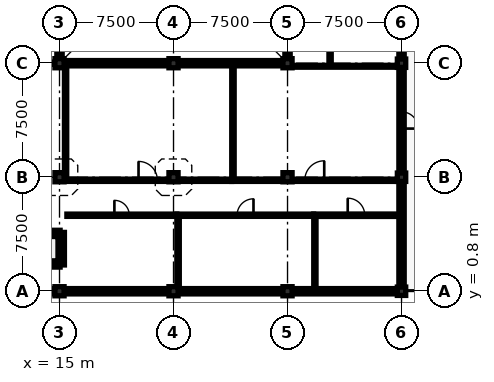
"""IFC4 building model, lengths in metres.
Left out: names, types, materials, properties, quantities, classifications, styles, units other than length and angle.
Written with IfcOpenShell. Run it as: python <this file> out.ifc"""

import sys

from ifc_helpers import new_model, si_unit, direction, frame, frame_2d, origin, origin_2d, place, context, subcontext, project, spatial, rectangle, extrude, element, fill, save


model = new_model("IFC4")
c1 = context("Model", 3, precision=1e-05, world=origin(), true_north=direction((0.0, 1.0)))
c2 = subcontext(c1, "Body", "Model", "MODEL_VIEW")
j1 = project(units=[si_unit("LENGTHUNIT", "METRE"), si_unit("PLANEANGLEUNIT", "RADIAN")], contexts=[c1])
p1 = place(None, origin())
s1 = spatial("IfcSite", under=j1, at=p1, CompositionType="ELEMENT")
p2 = place(p1, origin())
s2 = spatial("IfcBuilding", under=s1, at=p2, CompositionType="ELEMENT")
p3 = place(p2, frame((0.0, 0.0, 13.5)))
s3 = spatial("IfcBuildingStorey", under=s2, at=p3, CompositionType="ELEMENT", Elevation=13.5)
for number, where, z_axis, x_axis in (
    (1, (15.0, 0.8, 0.0), (0.0, 0.0, 1.0), (1.0, 0.0, 0.0)),
    (2, (15.0, 8.3, 0.0), (0.0, 0.0, 1.0), (1.0, 0.0, 0.0)),
    (3, (15.0, 15.8, 0.0), (0.0, 0.0, 1.0), (1.0, 0.0, 0.0)),
    (4, (22.5, 0.8, 0.0), (0.0, 0.0, 1.0), (1.0, 0.0, 0.0)),
    (5, (22.5, 8.3, 0.0), (0.0, 0.0, 1.0), (1.0, 0.0, 0.0)),
    (6, (22.5, 15.8, 0.0), (0.0, 0.0, 1.0), (1.0, 0.0, 0.0)),
    (7, (30.0, 0.8, 0.0), (0.0, 0.0, 1.0), (1.0, 0.0, 0.0)),
    (8, (30.0, 8.3, 0.0), (0.0, 0.0, 1.0), (1.0, 0.0, 0.0)),
    (9, (30.0, 15.8, 0.0), (0.0, 0.0, 1.0), (1.0, 0.0, 0.0)),
):
    element("IfcColumn", number, at=place(p3, frame(where, z_axis=z_axis, x_axis=x_axis)), inside=s3, PredefinedType="COLUMN", context=c2, shape_type="SweptSolid", body=[
        extrude(rectangle(XDim=0.6, YDim=0.6, at=origin_2d()), origin(), (0.0, 0.0, 1.0), 3.72),
    ])
for number, where, z_axis, x_axis in (
    (10, (37.5, 0.8, 0.0), (0.0, 0.0, 1.0), (1.0, 0.0, 0.0)),
    (11, (37.5, 8.3, 0.0), (0.0, 0.0, 1.0), (1.0, 0.0, 0.0)),
    (12, (37.5, 15.8, 0.0), (0.0, 0.0, 1.0), (1.0, 0.0, 0.0)),
):
    element("IfcColumn", number, at=place(p3, frame(where, z_axis=z_axis, x_axis=x_axis)), inside=s3, PredefinedType="COLUMN", context=c2, shape_type="SweptSolid", body=[
        extrude(rectangle(XDim=0.55, YDim=0.55, at=origin_2d()), origin(), (0.0, 0.0, 1.0), 3.75),
    ])
p4 = place(p3, frame((37.5, 23.05, 0.0), z_axis=(0.0, 0.0, 1.0), x_axis=(0.0, -1.0, 0.0)))
e13 = element("IfcWall", 13, at=p4, inside=s3, PredefinedType="SOLIDWALL", context=c2, shape_type="SweptSolid", body=[
    extrude(rectangle(XDim=6.975, YDim=0.35, at=frame_2d((3.488, 0.0))), origin(), (0.0, 0.0, 1.0), 3.055),
])
p5 = place(p3, frame((37.5, 15.525, 0.0), z_axis=(0.0, 0.0, 1.0), x_axis=(0.0, -1.0, 0.0)))
e14 = element("IfcWall", 14, at=p5, inside=s3, PredefinedType="SOLIDWALL", context=c2, shape_type="SweptSolid", body=[
    extrude(rectangle(XDim=6.95, YDim=0.35, at=frame_2d((3.475, 0.0))), origin(), (0.0, 0.0, 1.0), 3.005),
])
p6 = place(p5, frame((2.925, 0.0, 0.0)))
e15 = element("IfcOpeningElement", 15, at=p6, cuts=e14, PredefinedType="OPENING", context=c2, shape_type="SweptSolid", body=[
    extrude(rectangle(XDim=1.1, YDim=2.15, at=frame_2d((0.55, 1.075))), frame((0.0, 0.187, 0.0), z_axis=(0.0, -1.0, 0.0), x_axis=(1.0, 0.0, 0.0)), (0.0, 0.0, 1.0), 0.374),
])
p7 = place(p3, frame((37.5, 8.025, 0.0), z_axis=(0.0, 0.0, 1.0), x_axis=(0.0, -1.0, 0.0)))
e16 = element("IfcWall", 16, at=p7, inside=s3, PredefinedType="SOLIDWALL", context=c2, shape_type="SweptSolid", body=[
    extrude(rectangle(XDim=6.95, YDim=0.35, at=frame_2d((3.475, 0.0))), origin(), (0.0, 0.0, 1.0), 3.005),
])
p8 = place(p3, frame((37.225, 0.8, 0.0), z_axis=(0.0, 0.0, 1.0), x_axis=(-1.0, 0.0, 0.0)))
e17 = element("IfcWall", 17, at=p8, inside=s3, PredefinedType="SOLIDWALL", context=c2, shape_type="SweptSolid", body=[
    extrude(rectangle(XDim=6.925, YDim=0.35, at=frame_2d((3.462, 0.0))), origin(), (0.0, 0.0, 1.0), 3.005),
])
p9 = place(p3, frame((29.7, 0.8, 0.0), z_axis=(0.0, 0.0, 1.0), x_axis=(-1.0, 0.0, 0.0)))
e18 = element("IfcWall", 18, at=p9, inside=s3, PredefinedType="SOLIDWALL", context=c2, shape_type="SweptSolid", body=[
    extrude(rectangle(XDim=6.9, YDim=0.35, at=frame_2d((3.45, 0.0))), origin(), (0.0, 0.0, 1.0), 2.805),
])
p10 = place(p3, frame((22.2, 0.8, 0.0), z_axis=(0.0, 0.0, 1.0), x_axis=(-1.0, 0.0, 0.0)))
e19 = element("IfcWall", 19, at=p10, inside=s3, PredefinedType="SOLIDWALL", context=c2, shape_type="SweptSolid", body=[
    extrude(rectangle(XDim=6.9, YDim=0.35, at=frame_2d((3.45, 0.0))), origin(), (0.0, 0.0, 1.0), 2.805),
])
p11 = place(p10, frame((2.65, 0.0, 0.9)))
e20 = element("IfcOpeningElement", 20, at=p11, cuts=e19, PredefinedType="OPENING", context=c2, shape_type="SweptSolid", body=[
    extrude(rectangle(XDim=1.6, YDim=1.3, at=frame_2d((0.8, 0.65))), frame((0.0, 0.187, 0.0), z_axis=(0.0, -1.0, 0.0), x_axis=(1.0, 0.0, 0.0)), (0.0, 0.0, 1.0), 0.374),
])
p12 = place(p3, frame((14.7, 0.8, 0.0), z_axis=(0.0, 0.0, 1.0), x_axis=(-1.0, 0.0, 0.0)))
e21 = element("IfcWall", 21, at=p12, inside=s3, PredefinedType="SOLIDWALL", context=c2, shape_type="SweptSolid", body=[
    extrude(rectangle(XDim=6.9, YDim=0.35, at=frame_2d((3.45, 0.0))), origin(), (0.0, 0.0, 1.0), 3.055),
])
p13 = place(p12, frame((2.65, 0.0, 0.9)))
e22 = element("IfcOpeningElement", 22, at=p13, cuts=e21, PredefinedType="OPENING", context=c2, shape_type="SweptSolid", body=[
    extrude(rectangle(XDim=1.6, YDim=1.5, at=frame_2d((0.8, 0.75))), frame((0.0, 0.187, 0.0), z_axis=(0.0, -1.0, 0.0), x_axis=(1.0, 0.0, 0.0)), (0.0, 0.0, 1.0), 0.374),
])
for number, where, z_axis, x_axis in (
    (23, (15.3, 15.8, 0.0), (0.0, 0.0, 1.0), (1.0, 0.0, 0.0)),
    (24, (22.8, 15.8, 0.0), (0.0, 0.0, 1.0), (1.0, 0.0, 0.0)),
):
    element("IfcWall", number, at=place(p3, frame(where, z_axis=z_axis, x_axis=x_axis)), inside=s3, PredefinedType="SOLIDWALL", context=c2, shape_type="SweptSolid", body=[
        extrude(rectangle(XDim=6.9, YDim=0.35, at=frame_2d((3.45, 0.0))), origin(), (0.0, 0.0, 1.0), 2.805),
    ])
p14 = place(p3, frame((30.0, 16.1, 0.0), z_axis=(0.0, 0.0, 1.0), x_axis=(0.0, 1.0, 0.0)))
e25 = element("IfcWall", 25, at=p14, inside=s3, PredefinedType="SOLIDWALL", context=c2, shape_type="SweptSolid", body=[
    extrude(rectangle(XDim=6.95, YDim=0.35, at=frame_2d((3.475, 0.0))), origin(), (0.0, 0.0, 1.0), 3.055),
])
p15 = place(p14, frame((2.575, 0.0, 0.9)))
e26 = element("IfcOpeningElement", 26, at=p15, cuts=e25, PredefinedType="OPENING", context=c2, shape_type="SweptSolid", body=[
    extrude(rectangle(XDim=1.8, YDim=1.7, at=frame_2d((0.9, 0.85))), frame((0.0, 0.187, 0.0), z_axis=(0.0, -1.0, 0.0), x_axis=(1.0, 0.0, 0.0)), (0.0, 0.0, 1.0), 0.374),
])
p16 = place(p3, frame((15.0, 23.0, 0.0), z_axis=(0.0, 0.0, 1.0), x_axis=(0.0, -1.0, 0.0)))
e27 = element("IfcWall", 27, at=p16, inside=s3, PredefinedType="SOLIDWALL", context=c2, shape_type="SweptSolid", body=[
    extrude(rectangle(XDim=6.9, YDim=0.35, at=frame_2d((3.45, 0.0))), origin(), (0.0, 0.0, 1.0), 2.805),
])
p17 = place(p3, frame((12.928, 2.529, 0.0), z_axis=(0.0, 0.0, 1.0), x_axis=(1.0, 0.0, 0.0)))
e28 = element("IfcWall", 28, at=p17, inside=s3, PredefinedType="SHEAR", context=c2, shape_type="SweptSolid", body=[
    extrude(rectangle(XDim=2.11, YDim=0.28, at=frame_2d((1.055, 0.0))), origin(), (0.0, 0.0, 1.0), 3.72),
])
p18 = place(p3, frame((15.184, 2.529, 0.0), z_axis=(0.0, 0.0, 1.0), x_axis=(0.0, 1.0, 0.0)))
e29 = element("IfcWall", 29, at=p18, inside=s3, PredefinedType="SHEAR", context=c2, shape_type="SweptSolid", body=[
    extrude(rectangle(XDim=2.141, YDim=0.28, at=frame_2d((1.071, 0.0))), origin(), (0.0, 0.0, 1.0), 3.72),
])
p19 = place(p3, frame((15.039, 4.671, 0.0), z_axis=(0.0, 0.0, 1.0), x_axis=(-1.0, 0.0, 0.0)))
e30 = element("IfcWall", 30, at=p19, inside=s3, PredefinedType="SHEAR", context=c2, shape_type="SweptSolid", body=[
    extrude(rectangle(XDim=2.11, YDim=0.28, at=frame_2d((1.055, 0.0))), origin(), (0.0, 0.0, 1.0), 3.72),
])
p20 = place(p19, frame((0.505, 0.0, 0.0)))
e31 = element("IfcOpeningElement", 31, at=p20, cuts=e30, PredefinedType="OPENING", context=c2, shape_type="SweptSolid", body=[
    extrude(rectangle(XDim=1.1, YDim=2.15, at=frame_2d((0.55, 1.075))), frame((0.0, 0.152, 0.0), z_axis=(0.0, -1.0, 0.0), x_axis=(1.0, 0.0, 0.0)), (0.0, 0.0, 1.0), 0.304),
])
p21 = place(p3, frame((15.485, 5.8, 0.0), z_axis=(0.0, 0.0, 1.0), x_axis=(1.0, 0.0, 0.0)))
e32 = element("IfcWall", 32, at=p21, inside=s3, PredefinedType="PARTITIONING", context=c2, shape_type="SweptSolid", body=[
    extrude(rectangle(XDim=7.23, YDim=0.15, at=frame_2d((3.615, 0.0))), origin(), (0.0, 0.0, 1.0), 2.805),
])
p22 = place(p21, frame((3.125, 0.0, 0.0)))
e33 = element("IfcOpeningElement", 33, at=p22, cuts=e32, PredefinedType="OPENING", context=c2, shape_type="SweptSolid", body=[
    extrude(rectangle(XDim=0.98, YDim=2.12, at=frame_2d((0.49, 1.06))), frame((0.0, 0.087, 0.0), z_axis=(0.0, -1.0, 0.0), x_axis=(1.0, 0.0, 0.0)), (0.0, 0.0, 1.0), 0.174),
])
p23 = place(p3, frame((22.727, 5.8, 0.0), z_axis=(0.0, 0.0, 1.0), x_axis=(1.0, 0.0, 0.0)))
e34 = element("IfcWall", 34, at=p23, inside=s3, PredefinedType="PARTITIONING", context=c2, shape_type="SweptSolid", body=[
    extrude(rectangle(XDim=8.988, YDim=0.15, at=frame_2d((4.494, 0.0))), origin(), (0.0, 0.0, 1.0), 2.805),
])
p24 = place(p23, frame((3.954, 0.0, 0.0)))
e35 = element("IfcOpeningElement", 35, at=p24, cuts=e34, PredefinedType="OPENING", context=c2, shape_type="SweptSolid", body=[
    extrude(rectangle(XDim=1.08, YDim=2.18, at=frame_2d((0.54, 1.09))), frame((0.0, 0.087, 0.0), z_axis=(0.0, -1.0, 0.0), x_axis=(1.0, 0.0, 0.0)), (0.0, 0.0, 1.0), 0.174),
])
p25 = place(p3, frame((31.727, 5.8, 0.0), z_axis=(0.0, 0.0, 1.0), x_axis=(1.0, 0.0, 0.0)))
e36 = element("IfcWall", 36, at=p25, inside=s3, PredefinedType="PARTITIONING", context=c2, shape_type="SweptSolid", body=[
    extrude(rectangle(XDim=5.586, YDim=0.16, at=frame_2d((2.793, 0.0))), origin(), (0.0, 0.0, 1.0), 3.085),
])
p26 = place(p25, frame((2.233, 0.0, 0.0)))
e37 = element("IfcOpeningElement", 37, at=p26, cuts=e36, PredefinedType="OPENING", context=c2, shape_type="SweptSolid", body=[
    extrude(rectangle(XDim=1.12, YDim=2.2, at=frame_2d((0.56, 1.1))), frame((0.0, 0.092, 0.0), z_axis=(0.0, -1.0, 0.0), x_axis=(1.0, 0.0, 0.0)), (0.0, 0.0, 1.0), 0.184),
])
p27 = place(p3, frame((15.312, 8.1, 0.0), z_axis=(0.0, 0.0, 1.0), x_axis=(1.0, 0.0, 0.0)))
e38 = element("IfcWall", 38, at=p27, inside=s3, PredefinedType="PARTITIONING", context=c2, shape_type="SweptSolid", body=[
    extrude(rectangle(XDim=11.013, YDim=0.15, at=frame_2d((5.506, 0.0))), origin(), (0.0, 0.0, 1.0), 2.805),
])
p28 = place(p27, frame((4.886, 0.0, 0.0)))
e39 = element("IfcOpeningElement", 39, at=p28, cuts=e38, PredefinedType="OPENING", context=c2, shape_type="SweptSolid", body=[
    extrude(rectangle(XDim=1.24, YDim=2.2, at=frame_2d((0.62, 1.1))), frame((0.0, 0.087, 0.0), z_axis=(0.0, -1.0, 0.0), x_axis=(1.0, 0.0, 0.0)), (0.0, 0.0, 1.0), 0.174),
])
p29 = place(p3, frame((26.337, 8.1, 0.0), z_axis=(0.0, 0.0, 1.0), x_axis=(1.0, 0.0, 0.0)))
e40 = element("IfcWall", 40, at=p29, inside=s3, PredefinedType="PARTITIONING", context=c2, shape_type="SweptSolid", body=[
    extrude(rectangle(XDim=10.876, YDim=0.15, at=frame_2d((5.438, 0.0))), origin(), (0.0, 0.0, 1.0), 2.805),
])
p30 = place(p29, frame((4.798, 0.0, 0.0)))
e41 = element("IfcOpeningElement", 41, at=p30, cuts=e40, PredefinedType="OPENING", context=c2, shape_type="SweptSolid", body=[
    extrude(rectangle(XDim=1.28, YDim=2.22, at=frame_2d((0.64, 1.11))), frame((0.0, 0.087, 0.0), z_axis=(0.0, -1.0, 0.0), x_axis=(1.0, 0.0, 0.0)), (0.0, 0.0, 1.0), 0.174),
])
p31 = place(p3, frame((32.8, 15.885, 0.0), z_axis=(0.0, 0.0, 1.0), x_axis=(0.0, 1.0, 0.0)))
e42 = element("IfcWall", 42, at=p31, inside=s3, PredefinedType="PARTITIONING", context=c2, shape_type="SweptSolid", body=[
    extrude(rectangle(XDim=7.33, YDim=0.15, at=frame_2d((3.665, 0.0))), origin(), (0.0, 0.0, 1.0), 3.055),
])
p32 = place(p31, frame((2.945, 0.0, 0.0)))
e43 = element("IfcOpeningElement", 43, at=p32, cuts=e42, PredefinedType="OPENING", context=c2, shape_type="SweptSolid", body=[
    extrude(rectangle(XDim=1.44, YDim=2.32, at=frame_2d((0.72, 1.16))), frame((0.0, 0.087, 0.0), z_axis=(0.0, -1.0, 0.0), x_axis=(1.0, 0.0, 0.0)), (0.0, 0.0, 1.0), 0.174),
])
p33 = place(p3, frame((30.084, 15.6, 0.0), z_axis=(0.0, 0.0, 1.0), x_axis=(1.0, 0.0, 0.0)))
e44 = element("IfcWall", 44, at=p33, inside=s3, PredefinedType="PARTITIONING", context=c2, shape_type="SweptSolid", body=[
    extrude(rectangle(XDim=7.128, YDim=0.125, at=frame_2d((3.564, 0.0))), origin(), (0.0, 0.0, 1.0), 3.005),
])
p34 = place(p3, frame((12.485, 15.8, 0.0), z_axis=(0.0, 0.0, 1.0), x_axis=(1.0, 0.0, 0.0)))
e45 = element("IfcWall", 45, at=p34, inside=s3, PredefinedType="PARTITIONING", context=c2, shape_type="SweptSolid", body=[
    extrude(rectangle(XDim=2.203, YDim=0.15, at=frame_2d((1.102, 0.0))), origin(), (0.0, 0.0, 1.0), 2.805),
])
p35 = place(p3, frame((22.8, 1.112, 0.0), z_axis=(0.0, 0.0, 1.0), x_axis=(0.0, 1.0, 0.0)))
e46 = element("IfcWall", 46, at=p35, inside=s3, PredefinedType="PARTITIONING", context=c2, shape_type="SweptSolid", body=[
    extrude(rectangle(XDim=4.601, YDim=0.16, at=frame_2d((2.3, 0.0))), origin(), (0.0, 0.0, 1.0), 2.805),
])
p36 = place(p3, frame((31.8, 0.987, 0.0), z_axis=(0.0, 0.0, 1.0), x_axis=(0.0, 1.0, 0.0)))
e47 = element("IfcWall", 47, at=p36, inside=s3, PredefinedType="PARTITIONING", context=c2, shape_type="SweptSolid", body=[
    extrude(rectangle(XDim=4.721, YDim=0.15, at=frame_2d((2.36, 0.0))), origin(), (0.0, 0.0, 1.0), 3.055),
])
p37 = place(p3, frame((15.4, 8.187, 0.0), z_axis=(0.0, 0.0, 1.0), x_axis=(0.0, 1.0, 0.0)))
e48 = element("IfcWall", 48, at=p37, inside=s3, PredefinedType="PARTITIONING", context=c2, shape_type="SweptSolid", body=[
    extrude(rectangle(XDim=7.426, YDim=0.15, at=frame_2d((3.713, 0.0))), origin(), (0.0, 0.0, 1.0), 2.805),
])
p38 = place(p3, frame((26.41, 8.187, 0.0), z_axis=(0.0, 0.0, 1.0), x_axis=(0.0, 1.0, 0.0)))
e49 = element("IfcWall", 49, at=p38, inside=s3, PredefinedType="PARTITIONING", context=c2, shape_type="SweptSolid", body=[
    extrude(rectangle(XDim=7.426, YDim=0.16, at=frame_2d((3.713, 0.0))), origin(), (0.0, 0.0, 1.0), 2.805),
])
p39 = place(p6, origin())
e50 = element("IfcDoor", 50, at=p39, inside=s3, OperationType="SINGLE_SWING_RIGHT", PredefinedType="DOOR", context=c2, shape_type="SweptSolid", body=[
    extrude(rectangle(XDim=1.1, YDim=2.15, at=frame_2d((0.55, 1.075))), frame((0.0, 0.025, 0.0), z_axis=(0.0, -1.0, 0.0), x_axis=(1.0, 0.0, 0.0)), (0.0, 0.0, 1.0), 0.05),
])
fill(e15, e50)
p40 = place(p11, origin())
e51 = element("IfcWindow", 51, at=p40, inside=s3, PartitioningType="DOUBLE_PANEL_VERTICAL", PredefinedType="WINDOW", context=c2, shape_type="SweptSolid", body=[
    extrude(rectangle(XDim=1.6, YDim=1.3, at=frame_2d((0.8, 0.65))), frame((0.0, 0.03, 0.0), z_axis=(0.0, -1.0, 0.0), x_axis=(1.0, 0.0, 0.0)), (0.0, 0.0, 1.0), 0.06),
])
fill(e20, e51)
p41 = place(p20, origin())
e52 = element("IfcDoor", 52, at=p41, inside=s3, OperationType="SLIDING_TO_RIGHT", PredefinedType="DOOR", context=c2, shape_type="SweptSolid", body=[
    extrude(rectangle(XDim=1.1, YDim=2.15, at=frame_2d((0.55, 1.075))), frame((0.0, 0.025, 0.0), z_axis=(0.0, -1.0, 0.0), x_axis=(1.0, 0.0, 0.0)), (0.0, 0.0, 1.0), 0.05),
])
fill(e31, e52)
p42 = place(p22, origin())
e53 = element("IfcDoor", 53, at=p42, inside=s3, OperationType="SINGLE_SWING_LEFT", PredefinedType="DOOR", context=c2, shape_type="SweptSolid", body=[
    extrude(rectangle(XDim=0.98, YDim=2.12, at=frame_2d((0.49, 1.06))), frame((0.0, 0.025, 0.0), z_axis=(0.0, -1.0, 0.0), x_axis=(1.0, 0.0, 0.0)), (0.0, 0.0, 1.0), 0.05),
])
fill(e33, e53)
p43 = place(p24, origin())
e54 = element("IfcDoor", 54, at=p43, inside=s3, OperationType="SINGLE_SWING_RIGHT", PredefinedType="DOOR", context=c2, shape_type="SweptSolid", body=[
    extrude(rectangle(XDim=1.08, YDim=2.18, at=frame_2d((0.54, 1.09))), frame((0.0, 0.025, 0.0), z_axis=(0.0, -1.0, 0.0), x_axis=(1.0, 0.0, 0.0)), (0.0, 0.0, 1.0), 0.05),
])
fill(e35, e54)
p44 = place(p26, origin())
e55 = element("IfcDoor", 55, at=p44, inside=s3, OperationType="SINGLE_SWING_LEFT", PredefinedType="DOOR", context=c2, shape_type="SweptSolid", body=[
    extrude(rectangle(XDim=1.12, YDim=2.2, at=frame_2d((0.56, 1.1))), frame((0.0, 0.025, 0.0), z_axis=(0.0, -1.0, 0.0), x_axis=(1.0, 0.0, 0.0)), (0.0, 0.0, 1.0), 0.05),
])
fill(e37, e55)
p45 = place(p28, origin())
e56 = element("IfcDoor", 56, at=p45, inside=s3, OperationType="SINGLE_SWING_LEFT", PredefinedType="DOOR", context=c2, shape_type="SweptSolid", body=[
    extrude(rectangle(XDim=1.24, YDim=2.2, at=frame_2d((0.62, 1.1))), frame((0.0, 0.025, 0.0), z_axis=(0.0, -1.0, 0.0), x_axis=(1.0, 0.0, 0.0)), (0.0, 0.0, 1.0), 0.05),
])
fill(e39, e56)
p46 = place(p30, origin())
e57 = element("IfcDoor", 57, at=p46, inside=s3, OperationType="SINGLE_SWING_RIGHT", PredefinedType="DOOR", context=c2, shape_type="SweptSolid", body=[
    extrude(rectangle(XDim=1.28, YDim=2.22, at=frame_2d((0.64, 1.11))), frame((0.0, 0.025, 0.0), z_axis=(0.0, -1.0, 0.0), x_axis=(1.0, 0.0, 0.0)), (0.0, 0.0, 1.0), 0.05),
])
fill(e41, e57)
save(model, sys.argv[1])
